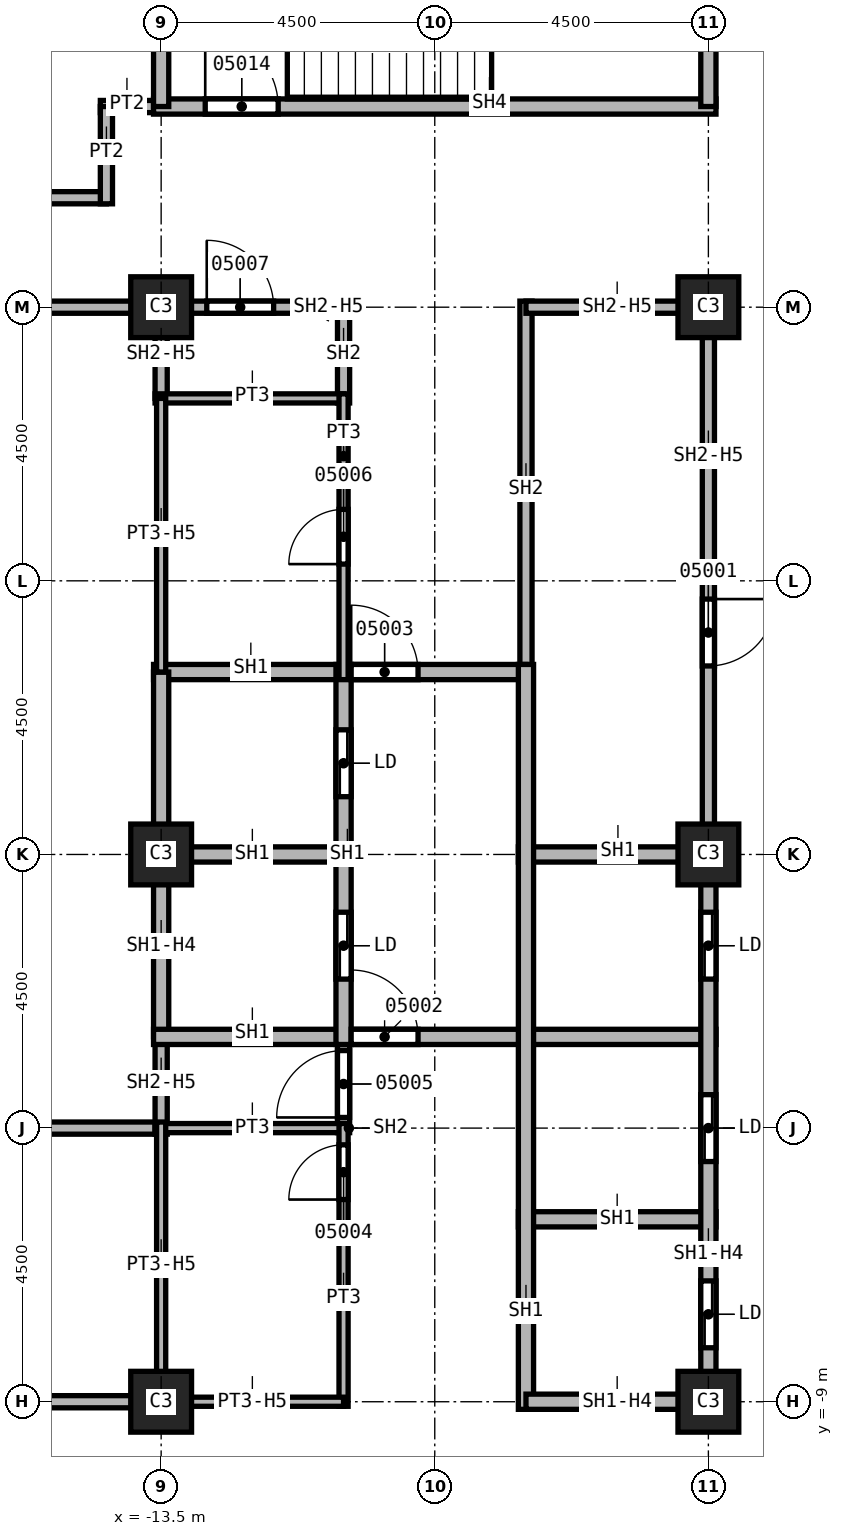
"""IFC4 building model, lengths in metres.
Left out: names, types, materials, properties, quantities, classifications, styles, units other than length and angle.
Written with IfcOpenShell. Run it as: python <this file> out.ifc"""

import sys

from ifc_helpers import new_model, si_unit, direction, frame, frame_2d, origin, origin_2d, place, context, subcontext, project, spatial, rectangle, extrude, element, fill, save


model = new_model("IFC4")
c1 = context("Model", 3, precision=1e-05, world=origin(), true_north=direction((0.0, 1.0)))
c2 = subcontext(c1, "Body", "Model", "MODEL_VIEW")
j1 = project(units=[si_unit("LENGTHUNIT", "METRE"), si_unit("PLANEANGLEUNIT", "RADIAN")], contexts=[c1])
p1 = place(None, origin())
s1 = spatial("IfcSite", under=j1, at=p1, CompositionType="ELEMENT")
p2 = place(p1, origin())
s2 = spatial("IfcBuilding", under=s1, at=p2, CompositionType="ELEMENT")
p3 = place(p2, frame((0.0, 0.0, 116.0)))
s3 = spatial("IfcBuildingStorey", under=s2, at=p3, CompositionType="ELEMENT", Elevation=116.0)
for number, where, z_axis, x_axis in (
    (1, (-4.5, 0.0, 0.0), (0.0, 0.0, 1.0), (1.0, 0.0, 0.0)),
    (2, (-4.5, 9.0, 0.0), (0.0, 0.0, 1.0), (1.0, 0.0, 0.0)),
    (3, (-4.5, -9.0, 0.0), (0.0, 0.0, 1.0), (1.0, 0.0, 0.0)),
    (4, (-13.5, 0.0, 0.0), (0.0, 0.0, 1.0), (1.0, 0.0, 0.0)),
    (5, (-13.5, 9.0, 0.0), (0.0, 0.0, 1.0), (1.0, 0.0, 0.0)),
    (6, (-13.5, -9.0, 0.0), (0.0, 0.0, 1.0), (1.0, 0.0, 0.0)),
):
    element("IfcColumn", number, at=place(p3, frame(where, z_axis=z_axis, x_axis=x_axis)), inside=s3, PredefinedType="COLUMN", context=c2, shape_type="SweptSolid", body=[
        extrude(rectangle(XDim=1.0, YDim=1.0, at=origin_2d()), origin(), (0.0, 0.0, 1.0), 3.6),
    ])
for number, where, z_axis, x_axis in (
    (7, (-18.0, -9.0, 0.0), (0.0, 0.0, 1.0), (1.0, 0.0, 0.0)),
    (8, (-18.0, -4.5, 0.0), (0.0, 0.0, 1.0), (1.0, 0.0, 0.0)),
):
    element("IfcWall", number, at=place(p3, frame(where, z_axis=z_axis, x_axis=x_axis)), inside=s3, PredefinedType="PARTITIONING", context=c2, shape_type="SweptSolid", body=[
        extrude(rectangle(XDim=4.5, YDim=0.2, at=frame_2d((2.25, 0.0))), origin(), (0.0, 0.0, 1.0), 3.6),
    ])
p4 = place(p3, frame((-18.0, 10.8, 0.0), z_axis=(0.0, 0.0, 1.0), x_axis=(1.0, 0.0, 0.0)))
e9 = element("IfcWall", 9, at=p4, inside=s3, PredefinedType="PARTITIONING", context=c2, shape_type="SweptSolid", body=[
    extrude(rectangle(XDim=3.6, YDim=0.2, at=frame_2d((1.8, 0.0))), origin(), (0.0, 0.0, 1.0), 3.6),
])
p5 = place(p4, frame((0.25, 0.0, 0.0)))
e10 = element("IfcOpeningElement", 10, at=p5, cuts=e9, PredefinedType="OPENING", context=c2, shape_type="SweptSolid", body=[
    extrude(rectangle(XDim=1.0, YDim=2.1, at=frame_2d((0.5, 1.05))), frame((0.0, 0.1, 0.0), z_axis=(0.0, -1.0, 0.0), x_axis=(1.0, 0.0, 0.0)), (0.0, 0.0, 1.0), 0.2),
])
p6 = place(p3, frame((-14.5, 12.3, 0.0), z_axis=(0.0, 0.0, 1.0), x_axis=(1.0, 0.0, 0.0)))
e11 = element("IfcWall", 11, at=p6, inside=s3, PredefinedType="PARTITIONING", context=c2, shape_type="SweptSolid", body=[
    extrude(rectangle(XDim=1.125, YDim=0.2, at=frame_2d((0.562, 0.0))), origin(), (0.0, 0.0, 1.0), 3.6),
])
p7 = place(p3, frame((-13.5, 9.0, 0.0), z_axis=(0.0, 0.0, 1.0), x_axis=(-1.0, 0.0, 0.0)))
e12 = element("IfcWall", 12, at=p7, inside=s3, PredefinedType="PARTITIONING", context=c2, shape_type="SweptSolid", body=[
    extrude(rectangle(XDim=4.5, YDim=0.2, at=frame_2d((2.25, 0.0))), origin(), (0.0, 0.0, 1.0), 3.6),
])
p8 = place(p3, frame((-14.4, 10.7, 0.0), z_axis=(0.0, 0.0, 1.0), x_axis=(0.0, 1.0, 0.0)))
e13 = element("IfcWall", 13, at=p8, inside=s3, PredefinedType="PARTITIONING", context=c2, shape_type="SweptSolid", body=[
    extrude(rectangle(XDim=1.6, YDim=0.2, at=frame_2d((0.8, 0.0))), origin(), (0.0, 0.0, 1.0), 3.6),
])
p9 = place(p3, frame((-13.6, 9.0, 0.0), z_axis=(0.0, 0.0, 1.0), x_axis=(1.0, 0.0, 0.0)))
e14 = element("IfcWall", 14, at=p9, inside=s3, PredefinedType="SOLIDWALL", context=c2, shape_type="SweptSolid", body=[
    extrude(rectangle(XDim=3.1, YDim=0.2, at=frame_2d((1.55, 0.0))), origin(), (0.0, 0.0, 1.0), 2.838),
])
p10 = place(p9, frame((0.85, 0.0, 0.0)))
e15 = element("IfcOpeningElement", 15, at=p10, cuts=e14, PredefinedType="OPENING", context=c2, shape_type="SweptSolid", body=[
    extrude(rectangle(XDim=1.1, YDim=2.1, at=frame_2d((0.55, 1.05))), frame((0.0, 0.1, 0.0), z_axis=(0.0, -1.0, 0.0), x_axis=(1.0, 0.0, 0.0)), (0.0, 0.0, 1.0), 0.2),
])
for number, where, z_axis, x_axis in (
    (16, (-13.5, -4.6, 0.0), (0.0, 0.0, 1.0), (0.0, 1.0, 0.0)),
    (17, (-13.5, 7.5, 0.0), (0.0, 0.0, 1.0), (0.0, 1.0, 0.0)),
):
    element("IfcWall", number, at=place(p3, frame(where, z_axis=z_axis, x_axis=x_axis)), inside=s3, PredefinedType="SOLIDWALL", context=c2, shape_type="SweptSolid", body=[
        extrude(rectangle(XDim=1.6, YDim=0.2, at=frame_2d((0.8, 0.0))), origin(), (0.0, 0.0, 1.0), 2.838),
    ])
p11 = place(p3, frame((-10.5, -4.575, 0.0), z_axis=(0.0, 0.0, 1.0), x_axis=(0.0, 1.0, 0.0)))
e18 = element("IfcWall", 18, at=p11, inside=s3, PredefinedType="SOLIDWALL", context=c2, shape_type="SweptSolid", body=[
    extrude(rectangle(XDim=1.7, YDim=0.2, at=frame_2d((0.85, 0.0))), origin(), (0.0, 0.0, 1.0), 3.6),
])
p12 = place(p11, frame((0.25, 0.0, 0.0)))
e19 = element("IfcOpeningElement", 19, at=p12, cuts=e18, PredefinedType="OPENING", context=c2, shape_type="SweptSolid", body=[
    extrude(rectangle(XDim=1.1, YDim=2.1, at=frame_2d((0.55, 1.05))), frame((0.0, 0.1, 0.0), z_axis=(0.0, -1.0, 0.0), x_axis=(1.0, 0.0, 0.0)), (0.0, 0.0, 1.0), 0.2),
])
p13 = place(p3, frame((-10.5, 7.425, 0.0), z_axis=(0.0, 0.0, 1.0), x_axis=(0.0, 1.0, 0.0)))
e20 = element("IfcWall", 20, at=p13, inside=s3, PredefinedType="SOLIDWALL", context=c2, shape_type="SweptSolid", body=[
    extrude(rectangle(XDim=1.675, YDim=0.2, at=frame_2d((0.837, 0.0))), origin(), (0.0, 0.0, 1.0), 3.6),
])
p14 = place(p3, frame((-7.5, 2.875, 0.0), z_axis=(0.0, 0.0, 1.0), x_axis=(0.0, 1.0, 0.0)))
e21 = element("IfcWall", 21, at=p14, inside=s3, PredefinedType="SOLIDWALL", context=c2, shape_type="SweptSolid", body=[
    extrude(rectangle(XDim=6.225, YDim=0.2, at=frame_2d((3.113, 0.0))), origin(), (0.0, 0.0, 1.0), 3.6),
])
p15 = place(p3, frame((-7.5, 9.0, 0.0), z_axis=(0.0, 0.0, 1.0), x_axis=(1.0, 0.0, 0.0)))
e22 = element("IfcWall", 22, at=p15, inside=s3, PredefinedType="SOLIDWALL", context=c2, shape_type="SweptSolid", body=[
    extrude(rectangle(XDim=3.0, YDim=0.2, at=frame_2d((1.5, 0.0))), origin(), (0.0, 0.0, 1.0), 2.838),
])
p16 = place(p3, frame((-4.5, 9.1, 0.0), z_axis=(0.0, 0.0, 1.0), x_axis=(0.0, -1.0, 0.0)))
e23 = element("IfcWall", 23, at=p16, inside=s3, PredefinedType="SOLIDWALL", context=c2, shape_type="SweptSolid", body=[
    extrude(rectangle(XDim=9.1, YDim=0.2, at=frame_2d((4.55, 0.0))), origin(), (0.0, 0.0, 1.0), 2.838),
])
p17 = place(p16, frame((4.9, 0.0, 0.0)))
e24 = element("IfcOpeningElement", 24, at=p17, cuts=e23, PredefinedType="OPENING", context=c2, shape_type="SweptSolid", body=[
    extrude(rectangle(XDim=1.1, YDim=2.1, at=frame_2d((0.55, 1.05))), frame((0.0, 0.1, 0.0), z_axis=(0.0, -1.0, 0.0), x_axis=(1.0, 0.0, 0.0)), (0.0, 0.0, 1.0), 0.2),
])
p18 = place(p3, frame((-13.625, 0.0, 0.0), z_axis=(0.0, 0.0, 1.0), x_axis=(1.0, 0.0, 0.0)))
e25 = element("IfcWall", 25, at=p18, inside=s3, PredefinedType="SOLIDWALL", context=c2, shape_type="SweptSolid", body=[
    extrude(rectangle(XDim=3.125, YDim=0.25, at=frame_2d((1.562, 0.0))), origin(), (0.0, 0.0, 1.0), 3.6),
])
p19 = place(p3, frame((-13.625, 3.0, 0.0), z_axis=(0.0, 0.0, 1.0), x_axis=(1.0, 0.0, 0.0)))
e26 = element("IfcWall", 26, at=p19, inside=s3, PredefinedType="SOLIDWALL", context=c2, shape_type="SweptSolid", body=[
    extrude(rectangle(XDim=6.125, YDim=0.25, at=frame_2d((3.062, 0.0))), origin(), (0.0, 0.0, 1.0), 3.6),
])
p20 = place(p19, frame((3.25, 0.0, 0.0)))
e27 = element("IfcOpeningElement", 27, at=p20, cuts=e26, PredefinedType="OPENING", context=c2, shape_type="SweptSolid", body=[
    extrude(rectangle(XDim=1.1, YDim=2.1, at=frame_2d((0.55, 1.05))), frame((0.0, 0.125, 0.0), z_axis=(0.0, -1.0, 0.0), x_axis=(1.0, 0.0, 0.0)), (0.0, 0.0, 1.0), 0.25),
])
p21 = place(p3, frame((-13.5, -3.0, 0.0), z_axis=(0.0, 0.0, 1.0), x_axis=(0.0, 1.0, 0.0)))
e28 = element("IfcWall", 28, at=p21, inside=s3, PredefinedType="SOLIDWALL", context=c2, shape_type="SweptSolid", body=[
    extrude(rectangle(XDim=6.0, YDim=0.25, at=frame_2d((3.0, 0.0))), origin(), (0.0, 0.0, 1.0), 2.838),
])
p22 = place(p3, frame((-13.625, -3.0, 0.0), z_axis=(0.0, 0.0, 1.0), x_axis=(1.0, 0.0, 0.0)))
e29 = element("IfcWall", 29, at=p22, inside=s3, PredefinedType="SOLIDWALL", context=c2, shape_type="SweptSolid", body=[
    extrude(rectangle(XDim=9.25, YDim=0.25, at=frame_2d((4.625, 0.0))), origin(), (0.0, 0.0, 1.0), 3.6),
])
p23 = place(p22, frame((3.25, 0.0, 0.0)))
e30 = element("IfcOpeningElement", 30, at=p23, cuts=e29, PredefinedType="OPENING", context=c2, shape_type="SweptSolid", body=[
    extrude(rectangle(XDim=1.1, YDim=2.1, at=frame_2d((0.55, 1.05))), frame((0.0, 0.125, 0.0), z_axis=(0.0, -1.0, 0.0), x_axis=(1.0, 0.0, 0.0)), (0.0, 0.0, 1.0), 0.25),
])
p24 = place(p3, frame((-10.5, -3.125, 0.0), z_axis=(0.0, 0.0, 1.0), x_axis=(0.0, 1.0, 0.0)))
e31 = element("IfcWall", 31, at=p24, inside=s3, PredefinedType="SOLIDWALL", context=c2, shape_type="SweptSolid", body=[
    extrude(rectangle(XDim=6.25, YDim=0.25, at=frame_2d((3.125, 0.0))), origin(), (0.0, 0.0, 1.0), 3.6),
])
p25 = place(p24, frame((1.075, 0.0, 0.0)))
e32 = element("IfcOpeningElement", 32, at=p25, cuts=e31, PredefinedType="OPENING", context=c2, shape_type="SweptSolid", body=[
    extrude(rectangle(XDim=1.1, YDim=2.1, at=frame_2d((0.55, 1.05))), frame((0.0, 0.125, 0.0), z_axis=(0.0, -1.0, 0.0), x_axis=(1.0, 0.0, 0.0)), (0.0, 0.0, 1.0), 0.25),
])
p26 = place(p24, frame((4.075, 0.0, 0.0)))
e33 = element("IfcOpeningElement", 33, at=p26, cuts=e31, PredefinedType="OPENING", context=c2, shape_type="SweptSolid", body=[
    extrude(rectangle(XDim=1.1, YDim=2.1, at=frame_2d((0.55, 1.05))), frame((0.0, 0.125, 0.0), z_axis=(0.0, -1.0, 0.0), x_axis=(1.0, 0.0, 0.0)), (0.0, 0.0, 1.0), 0.25),
])
for number, where, z_axis, x_axis in (
    (34, (-7.625, -6.0, 0.0), (0.0, 0.0, 1.0), (1.0, 0.0, 0.0)),
    (35, (-7.625, 0.0, 0.0), (0.0, 0.0, 1.0), (1.0, 0.0, 0.0)),
):
    element("IfcWall", number, at=place(p3, frame(where, z_axis=z_axis, x_axis=x_axis)), inside=s3, PredefinedType="SOLIDWALL", context=c2, shape_type="SweptSolid", body=[
        extrude(rectangle(XDim=3.25, YDim=0.25, at=frame_2d((1.625, 0.0))), origin(), (0.0, 0.0, 1.0), 3.6),
    ])
p27 = place(p3, frame((-7.5, -9.125, 0.0), z_axis=(0.0, 0.0, 1.0), x_axis=(0.0, 1.0, 0.0)))
e36 = element("IfcWall", 36, at=p27, inside=s3, PredefinedType="SOLIDWALL", context=c2, shape_type="SweptSolid", body=[
    extrude(rectangle(XDim=12.25, YDim=0.25, at=frame_2d((6.125, 0.0))), origin(), (0.0, 0.0, 1.0), 3.6),
])
p28 = place(p3, frame((-4.5, -9.0, 0.0), z_axis=(0.0, 0.0, 1.0), x_axis=(-1.0, 0.0, 0.0)))
e37 = element("IfcWall", 37, at=p28, inside=s3, PredefinedType="SOLIDWALL", context=c2, shape_type="SweptSolid", body=[
    extrude(rectangle(XDim=3.0, YDim=0.25, at=frame_2d((1.5, 0.0))), origin(), (0.0, 0.0, 1.0), 2.838),
])
p29 = place(p3, frame((-4.5, 0.0, 0.0), z_axis=(0.0, 0.0, 1.0), x_axis=(0.0, -1.0, 0.0)))
e38 = element("IfcWall", 38, at=p29, inside=s3, PredefinedType="SOLIDWALL", context=c2, shape_type="SweptSolid", body=[
    extrude(rectangle(XDim=9.125, YDim=0.25, at=frame_2d((4.562, 0.0))), origin(), (0.0, 0.0, 1.0), 2.838),
])
p30 = place(p29, frame((7.012, 0.0, 0.0)))
e39 = element("IfcOpeningElement", 39, at=p30, cuts=e38, PredefinedType="OPENING", context=c2, shape_type="SweptSolid", body=[
    extrude(rectangle(XDim=1.1, YDim=2.1, at=frame_2d((0.55, 1.05))), frame((0.0, 0.125, 0.0), z_axis=(0.0, -1.0, 0.0), x_axis=(1.0, 0.0, 0.0)), (0.0, 0.0, 1.0), 0.25),
])
p31 = place(p29, frame((3.95, 0.0, 0.0)))
e40 = element("IfcOpeningElement", 40, at=p31, cuts=e38, PredefinedType="OPENING", context=c2, shape_type="SweptSolid", body=[
    extrude(rectangle(XDim=1.1, YDim=2.1, at=frame_2d((0.55, 1.05))), frame((0.0, 0.125, 0.0), z_axis=(0.0, -1.0, 0.0), x_axis=(1.0, 0.0, 0.0)), (0.0, 0.0, 1.0), 0.25),
])
p32 = place(p29, frame((0.95, 0.0, 0.0)))
e41 = element("IfcOpeningElement", 41, at=p32, cuts=e38, PredefinedType="OPENING", context=c2, shape_type="SweptSolid", body=[
    extrude(rectangle(XDim=1.1, YDim=2.1, at=frame_2d((0.55, 1.05))), frame((0.0, 0.125, 0.0), z_axis=(0.0, -1.0, 0.0), x_axis=(1.0, 0.0, 0.0)), (0.0, 0.0, 1.0), 0.25),
])
p33 = place(p3, frame((-13.625, 12.3, 0.0), z_axis=(0.0, 0.0, 1.0), x_axis=(1.0, 0.0, 0.0)))
e42 = element("IfcWall", 42, at=p33, inside=s3, PredefinedType="SOLIDWALL", context=c2, shape_type="SweptSolid", body=[
    extrude(rectangle(XDim=9.25, YDim=0.25, at=frame_2d((4.625, 0.0))), origin(), (0.0, 0.0, 1.0), 3.6),
])
p34 = place(p33, frame((0.85, 0.0, 0.0)))
e43 = element("IfcOpeningElement", 43, at=p34, cuts=e42, PredefinedType="OPENING", context=c2, shape_type="SweptSolid", body=[
    extrude(rectangle(XDim=1.2, YDim=2.1, at=frame_2d((0.6, 1.05))), frame((0.0, 0.125, 0.0), z_axis=(0.0, -1.0, 0.0), x_axis=(1.0, 0.0, 0.0)), (0.0, 0.0, 1.0), 0.25),
])
for number, where, z_axis, x_axis in (
    (44, (-13.5, 12.3, 0.0), (0.0, 0.0, 1.0), (0.0, 1.0, 0.0)),
    (45, (-4.5, 16.8, 0.0), (0.0, 0.0, 1.0), (0.0, -1.0, 0.0)),
):
    element("IfcWall", number, at=place(p3, frame(where, z_axis=z_axis, x_axis=x_axis)), inside=s3, PredefinedType="SOLIDWALL", context=c2, shape_type="SweptSolid", body=[
        extrude(rectangle(XDim=4.5, YDim=0.25, at=frame_2d((2.25, 0.0))), origin(), (0.0, 0.0, 1.0), 3.6),
    ])
for number, where, z_axis, x_axis in (
    (46, (-13.6, -4.5, 0.0), (0.0, 0.0, 1.0), (1.0, 0.0, 0.0)),
    (47, (-13.6, 7.5, 0.0), (0.0, 0.0, 1.0), (1.0, 0.0, 0.0)),
):
    element("IfcWall", number, at=place(p3, frame(where, z_axis=z_axis, x_axis=x_axis)), inside=s3, PredefinedType="PARTITIONING", context=c2, shape_type="SweptSolid", body=[
        extrude(rectangle(XDim=3.1, YDim=0.15, at=frame_2d((1.55, 0.0))), origin(), (0.0, 0.0, 1.0), 3.6),
    ])
p35 = place(p3, frame((-13.5, -9.1, 0.0), z_axis=(0.0, 0.0, 1.0), x_axis=(0.0, 1.0, 0.0)))
e48 = element("IfcWall", 48, at=p35, inside=s3, PredefinedType="PARTITIONING", context=c2, shape_type="SweptSolid", body=[
    extrude(rectangle(XDim=4.7, YDim=0.15, at=frame_2d((2.35, 0.0))), origin(), (0.0, 0.0, 1.0), 2.838),
])
p36 = place(p3, frame((-13.5, 3.0, 0.0), z_axis=(0.0, 0.0, 1.0), x_axis=(0.0, 1.0, 0.0)))
e49 = element("IfcWall", 49, at=p36, inside=s3, PredefinedType="PARTITIONING", context=c2, shape_type="SweptSolid", body=[
    extrude(rectangle(XDim=4.5, YDim=0.15, at=frame_2d((2.25, 0.0))), origin(), (0.0, 0.0, 1.0), 2.838),
])
p37 = place(p3, frame((-10.5, -9.075, 0.0), z_axis=(0.0, 0.0, 1.0), x_axis=(0.0, 1.0, 0.0)))
e50 = element("IfcWall", 50, at=p37, inside=s3, PredefinedType="PARTITIONING", context=c2, shape_type="SweptSolid", body=[
    extrude(rectangle(XDim=4.65, YDim=0.15, at=frame_2d((2.325, 0.0))), origin(), (0.0, 0.0, 1.0), 3.6),
])
p38 = place(p37, frame((3.4, 0.0, 0.0)))
e51 = element("IfcOpeningElement", 51, at=p38, cuts=e50, PredefinedType="OPENING", context=c2, shape_type="SweptSolid", body=[
    extrude(rectangle(XDim=0.9, YDim=2.1, at=frame_2d((0.45, 1.05))), frame((0.0, 0.075, 0.0), z_axis=(0.0, -1.0, 0.0), x_axis=(1.0, 0.0, 0.0)), (0.0, 0.0, 1.0), 0.15),
])
p39 = place(p3, frame((-10.5, -9.0, 0.0), z_axis=(0.0, 0.0, 1.0), x_axis=(-1.0, 0.0, 0.0)))
e52 = element("IfcWall", 52, at=p39, inside=s3, PredefinedType="PARTITIONING", context=c2, shape_type="SweptSolid", body=[
    extrude(rectangle(XDim=3.075, YDim=0.15, at=frame_2d((1.538, 0.0))), origin(), (0.0, 0.0, 1.0), 2.838),
])
p40 = place(p3, frame((-10.5, 2.875, 0.0), z_axis=(0.0, 0.0, 1.0), x_axis=(0.0, 1.0, 0.0)))
e53 = element("IfcWall", 53, at=p40, inside=s3, PredefinedType="PARTITIONING", context=c2, shape_type="SweptSolid", body=[
    extrude(rectangle(XDim=4.7, YDim=0.15, at=frame_2d((2.35, 0.0))), origin(), (0.0, 0.0, 1.0), 3.6),
])
p41 = place(p40, frame((1.9, 0.0, 0.0)))
e54 = element("IfcOpeningElement", 54, at=p41, cuts=e53, PredefinedType="OPENING", context=c2, shape_type="SweptSolid", body=[
    extrude(rectangle(XDim=0.9, YDim=2.1, at=frame_2d((0.45, 1.05))), frame((0.0, 0.075, 0.0), z_axis=(0.0, -1.0, 0.0), x_axis=(1.0, 0.0, 0.0)), (0.0, 0.0, 1.0), 0.15),
])
p42 = place(p17, origin())
e55 = element("IfcDoor", 55, at=p42, inside=s3, OperationType="SINGLE_SWING_RIGHT", PredefinedType="DOOR", context=c2, shape_type="SweptSolid", body=[
    extrude(rectangle(XDim=1.1, YDim=2.1, at=frame_2d((0.55, 1.05))), frame((0.0, 0.025, 0.0), z_axis=(0.0, -1.0, 0.0), x_axis=(1.0, 0.0, 0.0)), (0.0, 0.0, 1.0), 0.05),
])
fill(e24, e55)
p43 = place(p23, origin())
e56 = element("IfcDoor", 56, at=p43, inside=s3, OperationType="SINGLE_SWING_LEFT", PredefinedType="DOOR", context=c2, shape_type="SweptSolid", body=[
    extrude(rectangle(XDim=1.1, YDim=2.1, at=frame_2d((0.55, 1.05))), frame((0.0, 0.025, 0.0), z_axis=(0.0, -1.0, 0.0), x_axis=(1.0, 0.0, 0.0)), (0.0, 0.0, 1.0), 0.05),
])
fill(e30, e56)
p44 = place(p20, origin())
e57 = element("IfcDoor", 57, at=p44, inside=s3, OperationType="SINGLE_SWING_RIGHT", PredefinedType="DOOR", context=c2, shape_type="SweptSolid", body=[
    extrude(rectangle(XDim=1.1, YDim=2.1, at=frame_2d((0.55, 1.05))), frame((0.0, 0.025, 0.0), z_axis=(0.0, -1.0, 0.0), x_axis=(1.0, 0.0, 0.0)), (0.0, 0.0, 1.0), 0.05),
])
fill(e27, e57)
p45 = place(p38, origin())
e58 = element("IfcDoor", 58, at=p45, inside=s3, OperationType="SINGLE_SWING_LEFT", PredefinedType="DOOR", context=c2, shape_type="SweptSolid", body=[
    extrude(rectangle(XDim=0.9, YDim=2.1, at=frame_2d((0.45, 1.05))), frame((0.0, 0.025, 0.0), z_axis=(0.0, -1.0, 0.0), x_axis=(1.0, 0.0, 0.0)), (0.0, 0.0, 1.0), 0.05),
])
fill(e51, e58)
p46 = place(p12, origin())
e59 = element("IfcDoor", 59, at=p46, inside=s3, OperationType="SINGLE_SWING_RIGHT", PredefinedType="DOOR", context=c2, shape_type="SweptSolid", body=[
    extrude(rectangle(XDim=1.1, YDim=2.1, at=frame_2d((0.55, 1.05))), frame((0.0, 0.025, 0.0), z_axis=(0.0, -1.0, 0.0), x_axis=(1.0, 0.0, 0.0)), (0.0, 0.0, 1.0), 0.05),
])
fill(e19, e59)
p47 = place(p41, origin())
e60 = element("IfcDoor", 60, at=p47, inside=s3, OperationType="SINGLE_SWING_LEFT", PredefinedType="DOOR", context=c2, shape_type="SweptSolid", body=[
    extrude(rectangle(XDim=0.9, YDim=2.1, at=frame_2d((0.45, 1.05))), frame((0.0, 0.025, 0.0), z_axis=(0.0, -1.0, 0.0), x_axis=(1.0, 0.0, 0.0)), (0.0, 0.0, 1.0), 0.05),
])
fill(e54, e60)
p48 = place(p10, origin())
e61 = element("IfcDoor", 61, at=p48, inside=s3, OperationType="SINGLE_SWING_RIGHT", PredefinedType="DOOR", context=c2, shape_type="SweptSolid", body=[
    extrude(rectangle(XDim=1.1, YDim=2.1, at=frame_2d((0.55, 1.05))), frame((0.0, 0.025, 0.0), z_axis=(0.0, -1.0, 0.0), x_axis=(1.0, 0.0, 0.0)), (0.0, 0.0, 1.0), 0.05),
])
fill(e15, e61)
p49 = place(p34, origin())
e62 = element("IfcDoor", 62, at=p49, inside=s3, OperationType="SINGLE_SWING_LEFT", PredefinedType="DOOR", context=c2, shape_type="SweptSolid", body=[
    extrude(rectangle(XDim=1.2, YDim=2.1, at=frame_2d((0.6, 1.05))), frame((0.0, 0.025, 0.0), z_axis=(0.0, -1.0, 0.0), x_axis=(1.0, 0.0, 0.0)), (0.0, 0.0, 1.0), 0.05),
])
fill(e43, e62)
p50 = place(p30, origin())
e63 = element("IfcDoor", 63, at=p50, inside=s3, OperationType="SLIDING_TO_LEFT", PredefinedType="DOOR", context=c2, shape_type="SweptSolid", body=[
    extrude(rectangle(XDim=1.1, YDim=2.1, at=frame_2d((0.55, 1.05))), frame((0.0, 0.025, 0.0), z_axis=(0.0, -1.0, 0.0), x_axis=(1.0, 0.0, 0.0)), (0.0, 0.0, 1.0), 0.05),
])
fill(e39, e63)
p51 = place(p31, origin())
e64 = element("IfcDoor", 64, at=p51, inside=s3, OperationType="SLIDING_TO_LEFT", PredefinedType="DOOR", context=c2, shape_type="SweptSolid", body=[
    extrude(rectangle(XDim=1.1, YDim=2.1, at=frame_2d((0.55, 1.05))), frame((0.0, 0.025, 0.0), z_axis=(0.0, -1.0, 0.0), x_axis=(1.0, 0.0, 0.0)), (0.0, 0.0, 1.0), 0.05),
])
fill(e40, e64)
p52 = place(p32, origin())
e65 = element("IfcDoor", 65, at=p52, inside=s3, OperationType="SLIDING_TO_LEFT", PredefinedType="DOOR", context=c2, shape_type="SweptSolid", body=[
    extrude(rectangle(XDim=1.1, YDim=2.1, at=frame_2d((0.55, 1.05))), frame((0.0, 0.025, 0.0), z_axis=(0.0, -1.0, 0.0), x_axis=(1.0, 0.0, 0.0)), (0.0, 0.0, 1.0), 0.05),
])
fill(e41, e65)
p53 = place(p25, origin())
e66 = element("IfcDoor", 66, at=p53, inside=s3, OperationType="SLIDING_TO_LEFT", PredefinedType="DOOR", context=c2, shape_type="SweptSolid", body=[
    extrude(rectangle(XDim=1.1, YDim=2.1, at=frame_2d((0.55, 1.05))), frame((0.0, 0.025, 0.0), z_axis=(0.0, -1.0, 0.0), x_axis=(1.0, 0.0, 0.0)), (0.0, 0.0, 1.0), 0.05),
])
fill(e32, e66)
p54 = place(p26, origin())
e67 = element("IfcDoor", 67, at=p54, inside=s3, OperationType="SLIDING_TO_LEFT", PredefinedType="DOOR", context=c2, shape_type="SweptSolid", body=[
    extrude(rectangle(XDim=1.1, YDim=2.1, at=frame_2d((0.55, 1.05))), frame((0.0, 0.025, 0.0), z_axis=(0.0, -1.0, 0.0), x_axis=(1.0, 0.0, 0.0)), (0.0, 0.0, 1.0), 0.05),
])
fill(e33, e67)
save(model, sys.argv[1])
